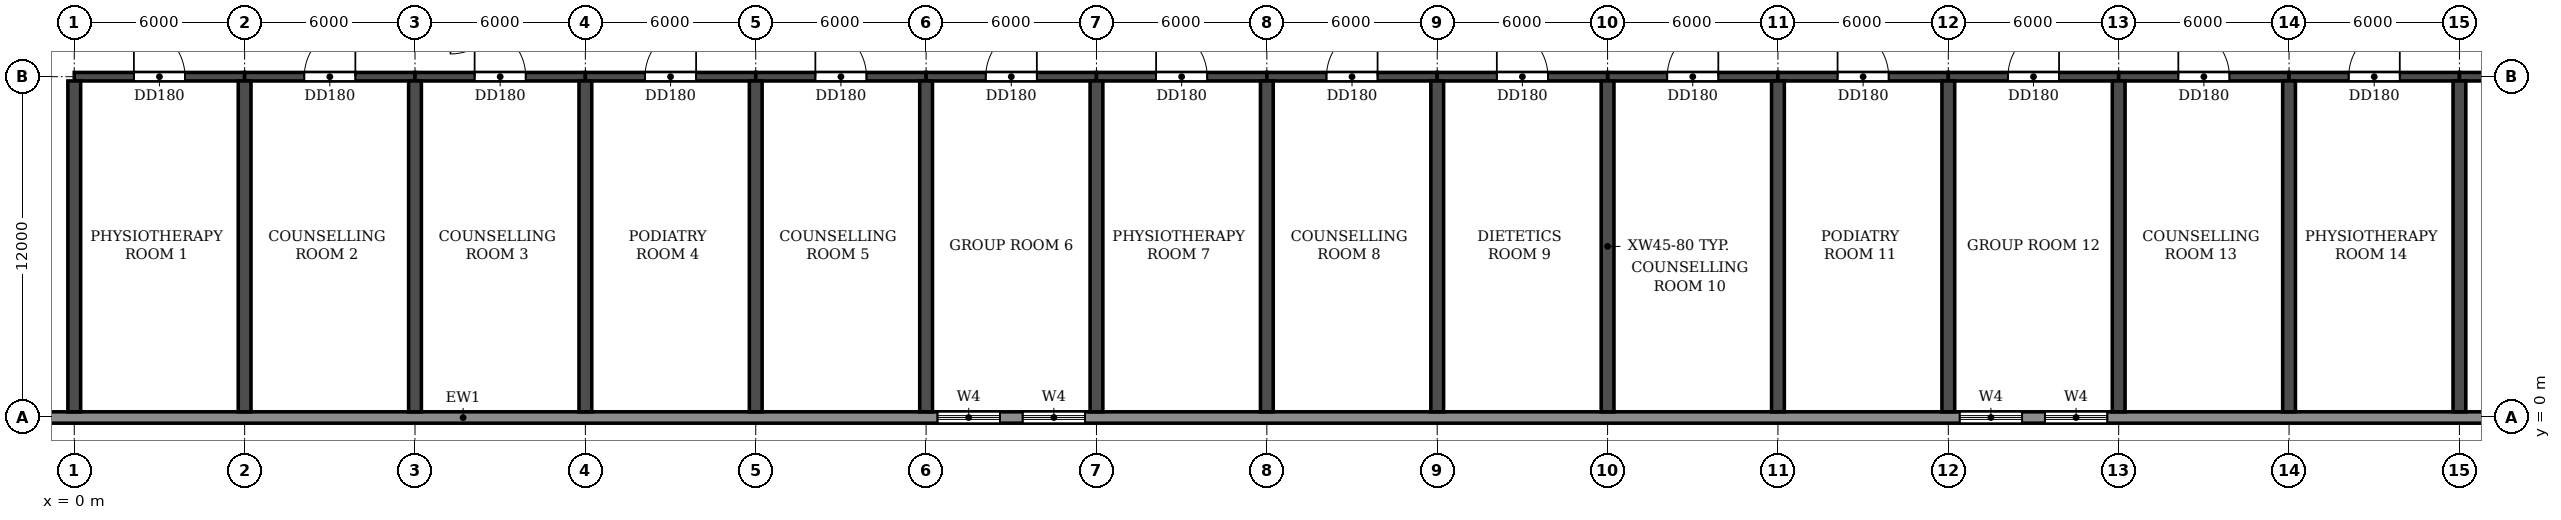
"""IFC4 building model, lengths in metres.
Left out: names, types, materials, properties, quantities, classifications, styles, units other than length and angle.
Written with IfcOpenShell. Run it as: python <this file> out.ifc"""

import sys

from ifc_helpers import new_model, si_unit, direction, frame, frame_2d, origin, place, context, subcontext, project, spatial, rectangle, extrude, element, fill, save


model = new_model("IFC4")
c1 = context("Model", 3, precision=1e-05, world=origin(), true_north=direction((0.0, 1.0)))
c2 = subcontext(c1, "Body", "Model", "MODEL_VIEW")
j1 = project(units=[si_unit("LENGTHUNIT", "METRE"), si_unit("PLANEANGLEUNIT", "RADIAN")], contexts=[c1])
p1 = place(None, origin())
s1 = spatial("IfcSite", under=j1, at=p1, CompositionType="ELEMENT")
p2 = place(p1, origin())
s2 = spatial("IfcBuilding", under=s1, at=p2, CompositionType="ELEMENT")
p3 = place(p2, frame((0.0, 0.0, 10.8)))
s3 = spatial("IfcBuildingStorey", under=s2, at=p3, CompositionType="ELEMENT", Elevation=10.8)
for number, where, z_axis, x_axis in (
    (1, (0.0, 0.2, 0.0), (0.0, 0.0, 1.0), (0.0, 1.0, 0.0)),
    (2, (6.0, 0.2, 0.0), (0.0, 0.0, 1.0), (0.0, 1.0, 0.0)),
    (3, (12.0, 0.2, 0.0), (0.0, 0.0, 1.0), (0.0, 1.0, 0.0)),
    (4, (18.0, 0.2, 0.0), (0.0, 0.0, 1.0), (0.0, 1.0, 0.0)),
    (5, (24.0, 0.2, 0.0), (0.0, 0.0, 1.0), (0.0, 1.0, 0.0)),
    (6, (30.0, 0.2, 0.0), (0.0, 0.0, 1.0), (0.0, 1.0, 0.0)),
    (7, (36.0, 0.2, 0.0), (0.0, 0.0, 1.0), (0.0, 1.0, 0.0)),
    (8, (42.0, 0.2, 0.0), (0.0, 0.0, 1.0), (0.0, 1.0, 0.0)),
    (9, (48.0, 0.2, 0.0), (0.0, 0.0, 1.0), (0.0, 1.0, 0.0)),
    (10, (54.0, 0.2, 0.0), (0.0, 0.0, 1.0), (0.0, 1.0, 0.0)),
    (11, (60.0, 0.2, 0.0), (0.0, 0.0, 1.0), (0.0, 1.0, 0.0)),
    (12, (66.0, 0.2, 0.0), (0.0, 0.0, 1.0), (0.0, 1.0, 0.0)),
    (13, (72.0, 0.2, 0.0), (0.0, 0.0, 1.0), (0.0, 1.0, 0.0)),
    (14, (78.0, 0.2, 0.0), (0.0, 0.0, 1.0), (0.0, 1.0, 0.0)),
    (15, (84.0, 0.2, 0.0), (0.0, 0.0, 1.0), (0.0, 1.0, 0.0)),
):
    element("IfcWall", number, at=place(p3, frame(where, z_axis=z_axis, x_axis=x_axis)), inside=s3, PredefinedType="SHEAR", context=c2, shape_type="SweptSolid", body=[
        extrude(rectangle(XDim=11.65, YDim=0.45, at=frame_2d((5.825, 0.0))), origin(), (0.0, 0.0, 1.0), 3.92),
    ])
p4 = place(p3, frame((0.0, 12.0, 0.0), z_axis=(0.0, 0.0, 1.0), x_axis=(1.0, 0.0, 0.0)))
e16 = element("IfcWall", 16, at=p4, inside=s3, PredefinedType="SHEAR", context=c2, shape_type="SweptSolid", body=[
    extrude(rectangle(XDim=6.0, YDim=0.3, at=frame_2d((3.0, 0.0))), origin(), (0.0, 0.0, 1.0), 3.32),
])
p5 = place(p4, frame((2.1, 0.0, 0.0)))
e17 = element("IfcOpeningElement", 17, at=p5, cuts=e16, PredefinedType="OPENING", context=c2, shape_type="SweptSolid", body=[
    extrude(rectangle(XDim=1.8, YDim=2.1, at=frame_2d((0.9, 1.05))), frame((0.0, 0.16, 0.0), z_axis=(0.0, -1.0, 0.0), x_axis=(1.0, 0.0, 0.0)), (0.0, 0.0, 1.0), 0.32),
])
p6 = place(p3, frame((6.0, 12.0, 0.0), z_axis=(0.0, 0.0, 1.0), x_axis=(1.0, 0.0, 0.0)))
e18 = element("IfcWall", 18, at=p6, inside=s3, PredefinedType="SHEAR", context=c2, shape_type="SweptSolid", body=[
    extrude(rectangle(XDim=6.0, YDim=0.3, at=frame_2d((3.0, 0.0))), origin(), (0.0, 0.0, 1.0), 3.32),
])
p7 = place(p6, frame((2.1, 0.0, 0.0)))
e19 = element("IfcOpeningElement", 19, at=p7, cuts=e18, PredefinedType="OPENING", context=c2, shape_type="SweptSolid", body=[
    extrude(rectangle(XDim=1.8, YDim=2.1, at=frame_2d((0.9, 1.05))), frame((0.0, 0.16, 0.0), z_axis=(0.0, -1.0, 0.0), x_axis=(1.0, 0.0, 0.0)), (0.0, 0.0, 1.0), 0.32),
])
p8 = place(p3, frame((12.0, 12.0, 0.0), z_axis=(0.0, 0.0, 1.0), x_axis=(1.0, 0.0, 0.0)))
e20 = element("IfcWall", 20, at=p8, inside=s3, PredefinedType="SHEAR", context=c2, shape_type="SweptSolid", body=[
    extrude(rectangle(XDim=6.0, YDim=0.3, at=frame_2d((3.0, 0.0))), origin(), (0.0, 0.0, 1.0), 3.32),
])
p9 = place(p8, frame((2.1, 0.0, 0.0)))
e21 = element("IfcOpeningElement", 21, at=p9, cuts=e20, PredefinedType="OPENING", context=c2, shape_type="SweptSolid", body=[
    extrude(rectangle(XDim=1.8, YDim=2.1, at=frame_2d((0.9, 1.05))), frame((0.0, 0.16, 0.0), z_axis=(0.0, -1.0, 0.0), x_axis=(1.0, 0.0, 0.0)), (0.0, 0.0, 1.0), 0.32),
])
p10 = place(p3, frame((18.0, 12.0, 0.0), z_axis=(0.0, 0.0, 1.0), x_axis=(1.0, 0.0, 0.0)))
e22 = element("IfcWall", 22, at=p10, inside=s3, PredefinedType="SHEAR", context=c2, shape_type="SweptSolid", body=[
    extrude(rectangle(XDim=6.0, YDim=0.3, at=frame_2d((3.0, 0.0))), origin(), (0.0, 0.0, 1.0), 3.32),
])
p11 = place(p10, frame((2.1, 0.0, 0.0)))
e23 = element("IfcOpeningElement", 23, at=p11, cuts=e22, PredefinedType="OPENING", context=c2, shape_type="SweptSolid", body=[
    extrude(rectangle(XDim=1.8, YDim=2.1, at=frame_2d((0.9, 1.05))), frame((0.0, 0.16, 0.0), z_axis=(0.0, -1.0, 0.0), x_axis=(1.0, 0.0, 0.0)), (0.0, 0.0, 1.0), 0.32),
])
p12 = place(p3, frame((24.0, 12.0, 0.0), z_axis=(0.0, 0.0, 1.0), x_axis=(1.0, 0.0, 0.0)))
e24 = element("IfcWall", 24, at=p12, inside=s3, PredefinedType="SHEAR", context=c2, shape_type="SweptSolid", body=[
    extrude(rectangle(XDim=6.0, YDim=0.3, at=frame_2d((3.0, 0.0))), origin(), (0.0, 0.0, 1.0), 3.32),
])
p13 = place(p12, frame((2.1, 0.0, 0.0)))
e25 = element("IfcOpeningElement", 25, at=p13, cuts=e24, PredefinedType="OPENING", context=c2, shape_type="SweptSolid", body=[
    extrude(rectangle(XDim=1.8, YDim=2.1, at=frame_2d((0.9, 1.05))), frame((0.0, 0.16, 0.0), z_axis=(0.0, -1.0, 0.0), x_axis=(1.0, 0.0, 0.0)), (0.0, 0.0, 1.0), 0.32),
])
p14 = place(p3, frame((30.0, 12.0, 0.0), z_axis=(0.0, 0.0, 1.0), x_axis=(1.0, 0.0, 0.0)))
e26 = element("IfcWall", 26, at=p14, inside=s3, PredefinedType="SHEAR", context=c2, shape_type="SweptSolid", body=[
    extrude(rectangle(XDim=6.0, YDim=0.3, at=frame_2d((3.0, 0.0))), origin(), (0.0, 0.0, 1.0), 3.32),
])
p15 = place(p14, frame((2.1, 0.0, 0.0)))
e27 = element("IfcOpeningElement", 27, at=p15, cuts=e26, PredefinedType="OPENING", context=c2, shape_type="SweptSolid", body=[
    extrude(rectangle(XDim=1.8, YDim=2.1, at=frame_2d((0.9, 1.05))), frame((0.0, 0.16, 0.0), z_axis=(0.0, -1.0, 0.0), x_axis=(1.0, 0.0, 0.0)), (0.0, 0.0, 1.0), 0.32),
])
p16 = place(p3, frame((36.0, 12.0, 0.0), z_axis=(0.0, 0.0, 1.0), x_axis=(1.0, 0.0, 0.0)))
e28 = element("IfcWall", 28, at=p16, inside=s3, PredefinedType="SHEAR", context=c2, shape_type="SweptSolid", body=[
    extrude(rectangle(XDim=6.0, YDim=0.3, at=frame_2d((3.0, 0.0))), origin(), (0.0, 0.0, 1.0), 3.32),
])
p17 = place(p16, frame((2.1, 0.0, 0.0)))
e29 = element("IfcOpeningElement", 29, at=p17, cuts=e28, PredefinedType="OPENING", context=c2, shape_type="SweptSolid", body=[
    extrude(rectangle(XDim=1.8, YDim=2.1, at=frame_2d((0.9, 1.05))), frame((0.0, 0.16, 0.0), z_axis=(0.0, -1.0, 0.0), x_axis=(1.0, 0.0, 0.0)), (0.0, 0.0, 1.0), 0.32),
])
p18 = place(p3, frame((42.0, 12.0, 0.0), z_axis=(0.0, 0.0, 1.0), x_axis=(1.0, 0.0, 0.0)))
e30 = element("IfcWall", 30, at=p18, inside=s3, PredefinedType="SHEAR", context=c2, shape_type="SweptSolid", body=[
    extrude(rectangle(XDim=6.0, YDim=0.3, at=frame_2d((3.0, 0.0))), origin(), (0.0, 0.0, 1.0), 3.32),
])
p19 = place(p18, frame((2.1, 0.0, 0.0)))
e31 = element("IfcOpeningElement", 31, at=p19, cuts=e30, PredefinedType="OPENING", context=c2, shape_type="SweptSolid", body=[
    extrude(rectangle(XDim=1.8, YDim=2.1, at=frame_2d((0.9, 1.05))), frame((0.0, 0.16, 0.0), z_axis=(0.0, -1.0, 0.0), x_axis=(1.0, 0.0, 0.0)), (0.0, 0.0, 1.0), 0.32),
])
p20 = place(p3, frame((48.0, 12.0, 0.0), z_axis=(0.0, 0.0, 1.0), x_axis=(1.0, 0.0, 0.0)))
e32 = element("IfcWall", 32, at=p20, inside=s3, PredefinedType="SHEAR", context=c2, shape_type="SweptSolid", body=[
    extrude(rectangle(XDim=6.0, YDim=0.3, at=frame_2d((3.0, 0.0))), origin(), (0.0, 0.0, 1.0), 3.32),
])
p21 = place(p20, frame((2.1, 0.0, 0.0)))
e33 = element("IfcOpeningElement", 33, at=p21, cuts=e32, PredefinedType="OPENING", context=c2, shape_type="SweptSolid", body=[
    extrude(rectangle(XDim=1.8, YDim=2.1, at=frame_2d((0.9, 1.05))), frame((0.0, 0.16, 0.0), z_axis=(0.0, -1.0, 0.0), x_axis=(1.0, 0.0, 0.0)), (0.0, 0.0, 1.0), 0.32),
])
p22 = place(p3, frame((54.0, 12.0, 0.0), z_axis=(0.0, 0.0, 1.0), x_axis=(1.0, 0.0, 0.0)))
e34 = element("IfcWall", 34, at=p22, inside=s3, PredefinedType="SHEAR", context=c2, shape_type="SweptSolid", body=[
    extrude(rectangle(XDim=6.0, YDim=0.3, at=frame_2d((3.0, 0.0))), origin(), (0.0, 0.0, 1.0), 3.32),
])
p23 = place(p22, frame((2.1, 0.0, 0.0)))
e35 = element("IfcOpeningElement", 35, at=p23, cuts=e34, PredefinedType="OPENING", context=c2, shape_type="SweptSolid", body=[
    extrude(rectangle(XDim=1.8, YDim=2.1, at=frame_2d((0.9, 1.05))), frame((0.0, 0.16, 0.0), z_axis=(0.0, -1.0, 0.0), x_axis=(1.0, 0.0, 0.0)), (0.0, 0.0, 1.0), 0.32),
])
p24 = place(p3, frame((60.0, 12.0, 0.0), z_axis=(0.0, 0.0, 1.0), x_axis=(1.0, 0.0, 0.0)))
e36 = element("IfcWall", 36, at=p24, inside=s3, PredefinedType="SHEAR", context=c2, shape_type="SweptSolid", body=[
    extrude(rectangle(XDim=6.0, YDim=0.3, at=frame_2d((3.0, 0.0))), origin(), (0.0, 0.0, 1.0), 3.32),
])
p25 = place(p24, frame((2.1, 0.0, 0.0)))
e37 = element("IfcOpeningElement", 37, at=p25, cuts=e36, PredefinedType="OPENING", context=c2, shape_type="SweptSolid", body=[
    extrude(rectangle(XDim=1.8, YDim=2.1, at=frame_2d((0.9, 1.05))), frame((0.0, 0.16, 0.0), z_axis=(0.0, -1.0, 0.0), x_axis=(1.0, 0.0, 0.0)), (0.0, 0.0, 1.0), 0.32),
])
p26 = place(p3, frame((66.0, 12.0, 0.0), z_axis=(0.0, 0.0, 1.0), x_axis=(1.0, 0.0, 0.0)))
e38 = element("IfcWall", 38, at=p26, inside=s3, PredefinedType="SHEAR", context=c2, shape_type="SweptSolid", body=[
    extrude(rectangle(XDim=6.0, YDim=0.3, at=frame_2d((3.0, 0.0))), origin(), (0.0, 0.0, 1.0), 3.32),
])
p27 = place(p26, frame((2.1, 0.0, 0.0)))
e39 = element("IfcOpeningElement", 39, at=p27, cuts=e38, PredefinedType="OPENING", context=c2, shape_type="SweptSolid", body=[
    extrude(rectangle(XDim=1.8, YDim=2.1, at=frame_2d((0.9, 1.05))), frame((0.0, 0.16, 0.0), z_axis=(0.0, -1.0, 0.0), x_axis=(1.0, 0.0, 0.0)), (0.0, 0.0, 1.0), 0.32),
])
p28 = place(p3, frame((72.0, 12.0, 0.0), z_axis=(0.0, 0.0, 1.0), x_axis=(1.0, 0.0, 0.0)))
e40 = element("IfcWall", 40, at=p28, inside=s3, PredefinedType="SHEAR", context=c2, shape_type="SweptSolid", body=[
    extrude(rectangle(XDim=6.0, YDim=0.3, at=frame_2d((3.0, 0.0))), origin(), (0.0, 0.0, 1.0), 3.32),
])
p29 = place(p28, frame((2.1, 0.0, 0.0)))
e41 = element("IfcOpeningElement", 41, at=p29, cuts=e40, PredefinedType="OPENING", context=c2, shape_type="SweptSolid", body=[
    extrude(rectangle(XDim=1.8, YDim=2.1, at=frame_2d((0.9, 1.05))), frame((0.0, 0.16, 0.0), z_axis=(0.0, -1.0, 0.0), x_axis=(1.0, 0.0, 0.0)), (0.0, 0.0, 1.0), 0.32),
])
p30 = place(p3, frame((78.0, 12.0, 0.0), z_axis=(0.0, 0.0, 1.0), x_axis=(1.0, 0.0, 0.0)))
e42 = element("IfcWall", 42, at=p30, inside=s3, PredefinedType="SHEAR", context=c2, shape_type="SweptSolid", body=[
    extrude(rectangle(XDim=6.0, YDim=0.3, at=frame_2d((3.0, 0.0))), origin(), (0.0, 0.0, 1.0), 3.32),
])
p31 = place(p30, frame((2.1, 0.0, 0.0)))
e43 = element("IfcOpeningElement", 43, at=p31, cuts=e42, PredefinedType="OPENING", context=c2, shape_type="SweptSolid", body=[
    extrude(rectangle(XDim=1.8, YDim=2.1, at=frame_2d((0.9, 1.05))), frame((0.0, 0.16, 0.0), z_axis=(0.0, -1.0, 0.0), x_axis=(1.0, 0.0, 0.0)), (0.0, 0.0, 1.0), 0.32),
])
p32 = place(p3, frame((84.0, 12.0, 0.0), z_axis=(0.0, 0.0, 1.0), x_axis=(1.0, 0.0, 0.0)))
e44 = element("IfcWall", 44, at=p32, inside=s3, PredefinedType="SHEAR", context=c2, shape_type="SweptSolid", body=[
    extrude(rectangle(XDim=6.0, YDim=0.3, at=frame_2d((3.0, 0.0))), origin(), (0.0, 0.0, 1.0), 3.32),
])
p33 = place(p32, frame((2.1, 0.0, 0.0)))
e45 = element("IfcOpeningElement", 45, at=p33, cuts=e44, PredefinedType="OPENING", context=c2, shape_type="SweptSolid", body=[
    extrude(rectangle(XDim=1.8, YDim=2.1, at=frame_2d((0.9, 1.05))), frame((0.0, 0.16, 0.0), z_axis=(0.0, -1.0, 0.0), x_axis=(1.0, 0.0, 0.0)), (0.0, 0.0, 1.0), 0.32),
])
p34 = place(p3, frame((-3.0, 0.0, 0.0), z_axis=(0.0, 0.0, 1.0), x_axis=(1.0, 0.0, 0.0)))
e46 = element("IfcWall", 46, at=p34, inside=s3, PredefinedType="STANDARD", context=c2, shape_type="SweptSolid", body=[
    extrude(rectangle(XDim=108.0, YDim=0.4, at=frame_2d((54.0, 0.0))), origin(), (0.0, 0.0, 1.0), 3.92),
])
p35 = place(p34, frame((33.4, 0.0, 0.9)))
e47 = element("IfcOpeningElement", 47, at=p35, cuts=e46, PredefinedType="OPENING", context=c2, shape_type="SweptSolid", body=[
    extrude(rectangle(XDim=2.2, YDim=2.7, at=frame_2d((1.1, 1.35))), frame((0.0, 0.21, 0.0), z_axis=(0.0, -1.0, 0.0), x_axis=(1.0, 0.0, 0.0)), (0.0, 0.0, 1.0), 0.42),
])
p36 = place(p34, frame((36.4, 0.0, 0.9)))
e48 = element("IfcOpeningElement", 48, at=p36, cuts=e46, PredefinedType="OPENING", context=c2, shape_type="SweptSolid", body=[
    extrude(rectangle(XDim=2.2, YDim=2.7, at=frame_2d((1.1, 1.35))), frame((0.0, 0.21, 0.0), z_axis=(0.0, -1.0, 0.0), x_axis=(1.0, 0.0, 0.0)), (0.0, 0.0, 1.0), 0.42),
])
p37 = place(p34, frame((69.4, 0.0, 0.9)))
e49 = element("IfcOpeningElement", 49, at=p37, cuts=e46, PredefinedType="OPENING", context=c2, shape_type="SweptSolid", body=[
    extrude(rectangle(XDim=2.2, YDim=2.7, at=frame_2d((1.1, 1.35))), frame((0.0, 0.21, 0.0), z_axis=(0.0, -1.0, 0.0), x_axis=(1.0, 0.0, 0.0)), (0.0, 0.0, 1.0), 0.42),
])
p38 = place(p34, frame((72.4, 0.0, 0.9)))
e50 = element("IfcOpeningElement", 50, at=p38, cuts=e46, PredefinedType="OPENING", context=c2, shape_type="SweptSolid", body=[
    extrude(rectangle(XDim=2.2, YDim=2.7, at=frame_2d((1.1, 1.35))), frame((0.0, 0.21, 0.0), z_axis=(0.0, -1.0, 0.0), x_axis=(1.0, 0.0, 0.0)), (0.0, 0.0, 1.0), 0.42),
])
p39 = place(p35, origin())
e51 = element("IfcWindow", 51, at=p39, inside=s3, PartitioningType="DOUBLE_PANEL_HORIZONTAL", PredefinedType="WINDOW", context=c2, shape_type="SweptSolid", body=[
    extrude(rectangle(XDim=2.2, YDim=2.7, at=frame_2d((1.1, 1.35))), frame((0.0, 0.03, 0.0), z_axis=(0.0, -1.0, 0.0), x_axis=(1.0, 0.0, 0.0)), (0.0, 0.0, 1.0), 0.06),
])
fill(e47, e51)
p40 = place(p36, origin())
e52 = element("IfcWindow", 52, at=p40, inside=s3, PartitioningType="DOUBLE_PANEL_HORIZONTAL", PredefinedType="WINDOW", context=c2, shape_type="SweptSolid", body=[
    extrude(rectangle(XDim=2.2, YDim=2.7, at=frame_2d((1.1, 1.35))), frame((0.0, 0.03, 0.0), z_axis=(0.0, -1.0, 0.0), x_axis=(1.0, 0.0, 0.0)), (0.0, 0.0, 1.0), 0.06),
])
fill(e48, e52)
p41 = place(p37, origin())
e53 = element("IfcWindow", 53, at=p41, inside=s3, PartitioningType="DOUBLE_PANEL_HORIZONTAL", PredefinedType="WINDOW", context=c2, shape_type="SweptSolid", body=[
    extrude(rectangle(XDim=2.2, YDim=2.7, at=frame_2d((1.1, 1.35))), frame((0.0, 0.03, 0.0), z_axis=(0.0, -1.0, 0.0), x_axis=(1.0, 0.0, 0.0)), (0.0, 0.0, 1.0), 0.06),
])
fill(e49, e53)
p42 = place(p38, origin())
e54 = element("IfcWindow", 54, at=p42, inside=s3, PartitioningType="DOUBLE_PANEL_HORIZONTAL", PredefinedType="WINDOW", context=c2, shape_type="SweptSolid", body=[
    extrude(rectangle(XDim=2.2, YDim=2.7, at=frame_2d((1.1, 1.35))), frame((0.0, 0.03, 0.0), z_axis=(0.0, -1.0, 0.0), x_axis=(1.0, 0.0, 0.0)), (0.0, 0.0, 1.0), 0.06),
])
fill(e50, e54)
p43 = place(p5, origin())
e55 = element("IfcDoor", 55, at=p43, inside=s3, OperationType="DOUBLE_DOOR_SINGLE_SWING", PredefinedType="DOOR", context=c2, shape_type="SweptSolid", body=[
    extrude(rectangle(XDim=1.8, YDim=2.1, at=frame_2d((0.9, 1.05))), frame((0.0, 0.025, 0.0), z_axis=(0.0, -1.0, 0.0), x_axis=(1.0, 0.0, 0.0)), (0.0, 0.0, 1.0), 0.05),
])
fill(e17, e55)
p44 = place(p7, origin())
e56 = element("IfcDoor", 56, at=p44, inside=s3, OperationType="DOUBLE_DOOR_SINGLE_SWING", PredefinedType="DOOR", context=c2, shape_type="SweptSolid", body=[
    extrude(rectangle(XDim=1.8, YDim=2.1, at=frame_2d((0.9, 1.05))), frame((0.0, 0.025, 0.0), z_axis=(0.0, -1.0, 0.0), x_axis=(1.0, 0.0, 0.0)), (0.0, 0.0, 1.0), 0.05),
])
fill(e19, e56)
p45 = place(p9, origin())
e57 = element("IfcDoor", 57, at=p45, inside=s3, OperationType="DOUBLE_DOOR_SINGLE_SWING", PredefinedType="DOOR", context=c2, shape_type="SweptSolid", body=[
    extrude(rectangle(XDim=1.8, YDim=2.1, at=frame_2d((0.9, 1.05))), frame((0.0, 0.025, 0.0), z_axis=(0.0, -1.0, 0.0), x_axis=(1.0, 0.0, 0.0)), (0.0, 0.0, 1.0), 0.05),
])
fill(e21, e57)
p46 = place(p11, origin())
e58 = element("IfcDoor", 58, at=p46, inside=s3, OperationType="DOUBLE_DOOR_SINGLE_SWING", PredefinedType="DOOR", context=c2, shape_type="SweptSolid", body=[
    extrude(rectangle(XDim=1.8, YDim=2.1, at=frame_2d((0.9, 1.05))), frame((0.0, 0.025, 0.0), z_axis=(0.0, -1.0, 0.0), x_axis=(1.0, 0.0, 0.0)), (0.0, 0.0, 1.0), 0.05),
])
fill(e23, e58)
p47 = place(p13, origin())
e59 = element("IfcDoor", 59, at=p47, inside=s3, OperationType="DOUBLE_DOOR_SINGLE_SWING", PredefinedType="DOOR", context=c2, shape_type="SweptSolid", body=[
    extrude(rectangle(XDim=1.8, YDim=2.1, at=frame_2d((0.9, 1.05))), frame((0.0, 0.025, 0.0), z_axis=(0.0, -1.0, 0.0), x_axis=(1.0, 0.0, 0.0)), (0.0, 0.0, 1.0), 0.05),
])
fill(e25, e59)
p48 = place(p15, origin())
e60 = element("IfcDoor", 60, at=p48, inside=s3, OperationType="DOUBLE_DOOR_SINGLE_SWING", PredefinedType="DOOR", context=c2, shape_type="SweptSolid", body=[
    extrude(rectangle(XDim=1.8, YDim=2.1, at=frame_2d((0.9, 1.05))), frame((0.0, 0.025, 0.0), z_axis=(0.0, -1.0, 0.0), x_axis=(1.0, 0.0, 0.0)), (0.0, 0.0, 1.0), 0.05),
])
fill(e27, e60)
p49 = place(p17, origin())
e61 = element("IfcDoor", 61, at=p49, inside=s3, OperationType="DOUBLE_DOOR_SINGLE_SWING", PredefinedType="DOOR", context=c2, shape_type="SweptSolid", body=[
    extrude(rectangle(XDim=1.8, YDim=2.1, at=frame_2d((0.9, 1.05))), frame((0.0, 0.025, 0.0), z_axis=(0.0, -1.0, 0.0), x_axis=(1.0, 0.0, 0.0)), (0.0, 0.0, 1.0), 0.05),
])
fill(e29, e61)
p50 = place(p19, origin())
e62 = element("IfcDoor", 62, at=p50, inside=s3, OperationType="DOUBLE_DOOR_SINGLE_SWING", PredefinedType="DOOR", context=c2, shape_type="SweptSolid", body=[
    extrude(rectangle(XDim=1.8, YDim=2.1, at=frame_2d((0.9, 1.05))), frame((0.0, 0.025, 0.0), z_axis=(0.0, -1.0, 0.0), x_axis=(1.0, 0.0, 0.0)), (0.0, 0.0, 1.0), 0.05),
])
fill(e31, e62)
p51 = place(p21, origin())
e63 = element("IfcDoor", 63, at=p51, inside=s3, OperationType="DOUBLE_DOOR_SINGLE_SWING", PredefinedType="DOOR", context=c2, shape_type="SweptSolid", body=[
    extrude(rectangle(XDim=1.8, YDim=2.1, at=frame_2d((0.9, 1.05))), frame((0.0, 0.025, 0.0), z_axis=(0.0, -1.0, 0.0), x_axis=(1.0, 0.0, 0.0)), (0.0, 0.0, 1.0), 0.05),
])
fill(e33, e63)
p52 = place(p23, origin())
e64 = element("IfcDoor", 64, at=p52, inside=s3, OperationType="DOUBLE_DOOR_SINGLE_SWING", PredefinedType="DOOR", context=c2, shape_type="SweptSolid", body=[
    extrude(rectangle(XDim=1.8, YDim=2.1, at=frame_2d((0.9, 1.05))), frame((0.0, 0.025, 0.0), z_axis=(0.0, -1.0, 0.0), x_axis=(1.0, 0.0, 0.0)), (0.0, 0.0, 1.0), 0.05),
])
fill(e35, e64)
p53 = place(p25, origin())
e65 = element("IfcDoor", 65, at=p53, inside=s3, OperationType="DOUBLE_DOOR_SINGLE_SWING", PredefinedType="DOOR", context=c2, shape_type="SweptSolid", body=[
    extrude(rectangle(XDim=1.8, YDim=2.1, at=frame_2d((0.9, 1.05))), frame((0.0, 0.025, 0.0), z_axis=(0.0, -1.0, 0.0), x_axis=(1.0, 0.0, 0.0)), (0.0, 0.0, 1.0), 0.05),
])
fill(e37, e65)
p54 = place(p27, origin())
e66 = element("IfcDoor", 66, at=p54, inside=s3, OperationType="DOUBLE_DOOR_SINGLE_SWING", PredefinedType="DOOR", context=c2, shape_type="SweptSolid", body=[
    extrude(rectangle(XDim=1.8, YDim=2.1, at=frame_2d((0.9, 1.05))), frame((0.0, 0.025, 0.0), z_axis=(0.0, -1.0, 0.0), x_axis=(1.0, 0.0, 0.0)), (0.0, 0.0, 1.0), 0.05),
])
fill(e39, e66)
p55 = place(p29, origin())
e67 = element("IfcDoor", 67, at=p55, inside=s3, OperationType="DOUBLE_DOOR_SINGLE_SWING", PredefinedType="DOOR", context=c2, shape_type="SweptSolid", body=[
    extrude(rectangle(XDim=1.8, YDim=2.1, at=frame_2d((0.9, 1.05))), frame((0.0, 0.025, 0.0), z_axis=(0.0, -1.0, 0.0), x_axis=(1.0, 0.0, 0.0)), (0.0, 0.0, 1.0), 0.05),
])
fill(e41, e67)
p56 = place(p31, origin())
e68 = element("IfcDoor", 68, at=p56, inside=s3, OperationType="DOUBLE_DOOR_SINGLE_SWING", PredefinedType="DOOR", context=c2, shape_type="SweptSolid", body=[
    extrude(rectangle(XDim=1.8, YDim=2.1, at=frame_2d((0.9, 1.05))), frame((0.0, 0.025, 0.0), z_axis=(0.0, -1.0, 0.0), x_axis=(1.0, 0.0, 0.0)), (0.0, 0.0, 1.0), 0.05),
])
fill(e43, e68)
save(model, sys.argv[1])
